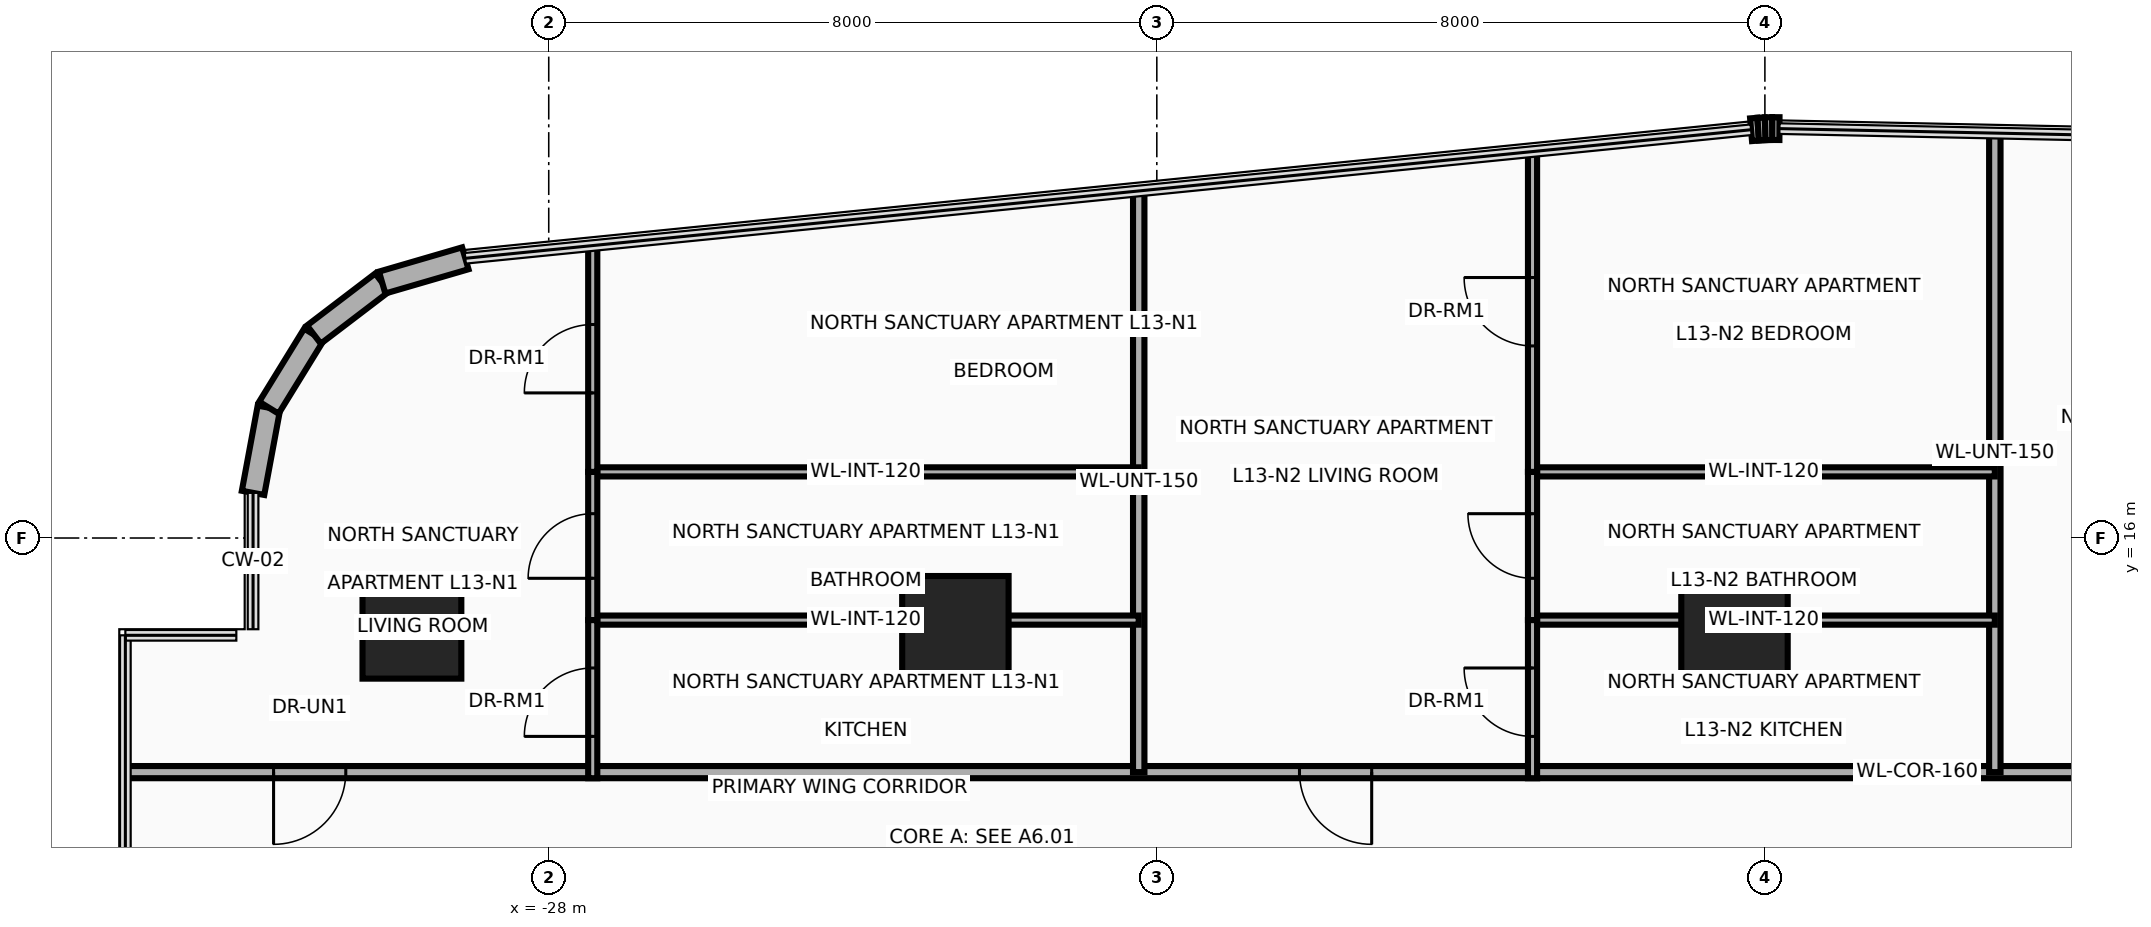
"""IFC4 building model, lengths in metres.
Left out: names, types, materials, properties, quantities, classifications, styles, units other than length and angle.
Written with IfcOpenShell. Run it as: python <this file> out.ifc"""

import sys

from ifc_helpers import new_model, si_unit, direction, frame, frame_2d, origin, origin_2d, place, context, subcontext, project, spatial, rectangle, circle, extrude, source, transform, mapped, element, fill, save


model = new_model("IFC4")
c1 = context("Model", 3, precision=1e-05, world=origin(), true_north=direction((0.0, 1.0)))
c2 = subcontext(c1, "Body", "Model", "MODEL_VIEW")
j1 = project(units=[si_unit("LENGTHUNIT", "METRE"), si_unit("PLANEANGLEUNIT", "RADIAN")], contexts=[c1])
p1 = place(None, origin())
s1 = spatial("IfcSite", under=j1, at=p1, CompositionType="ELEMENT")
p2 = place(p1, origin())
s2 = spatial("IfcBuilding", under=s1, at=p2, CompositionType="ELEMENT")
p3 = place(p2, frame((0.0, 0.0, 55.6)))
s3 = spatial("IfcBuildingStorey", under=s2, at=p3, CompositionType="ELEMENT", Elevation=55.6)
m1 = source(origin(), c2, "Body", "SweptSolid", [
    extrude(circle(Radius=0.65, at=origin_2d()), origin(), (0.0, 0.0, 1.0), 3.7),
])
p4 = place(p3, frame((-29.8, 14.8, 0.0), z_axis=(0.0, 0.0, 1.0), x_axis=(1.0, 0.0, 0.0)))
e1 = element("IfcColumn", 1, at=p4, inside=s3, PredefinedType="COLUMN", context=c2, shape_type="MappedRepresentation", body=[
    mapped(m1, transform((0.0, 0.0, 0.0), x_axis=(1.0, 0.0, 0.0), y_axis=(0.0, 1.0, 0.0), z_axis=(0.0, 0.0, 1.0), scale=1.0)),
])
m2 = source(origin(), c2, "Body", "SweptSolid", [
    extrude(rectangle(XDim=1.4, YDim=1.4, at=origin_2d()), origin(), (0.0, 0.0, 1.0), 3.7),
])
for number, where, z_axis, x_axis in (
    (2, (-22.65, 14.8, 0.0), (0.0, 0.0, 1.0), (1.0, 0.0, 0.0)),
    (3, (-12.4, 14.8, 0.0), (0.0, 0.0, 1.0), (1.0, 0.0, 0.0)),
):
    element("IfcColumn", number, at=place(p3, frame(where, z_axis=z_axis, x_axis=x_axis)), inside=s3, PredefinedType="COLUMN", context=c2, shape_type="MappedRepresentation", body=[
        mapped(m2, transform((0.0, 0.0, 0.0), x_axis=(1.0, 0.0, 0.0), y_axis=(0.0, 1.0, 0.0), z_axis=(0.0, 0.0, 1.0), scale=1.0)),
    ])
p5 = place(p3, frame((-31.89, 16.594, 0.0), z_axis=(0.0, 0.0, 1.0), x_axis=(0.182748995683, 0.9831596028, 0.0)))
e4 = element("IfcWall", 4, at=p5, inside=s3, PredefinedType="SOLIDWALL", context=c2, shape_type="SweptSolid", body=[
    extrude(rectangle(XDim=1.14, YDim=0.3, at=frame_2d((0.57, 0.0))), origin(), (0.0, 0.0, 1.0), 3.46),
])
p6 = place(p3, frame((-31.682, 17.714, 0.0), z_axis=(0.0, 0.0, 1.0), x_axis=(0.524157723014, 0.8516212077, 0.0)))
e5 = element("IfcWall", 5, at=p6, inside=s3, PredefinedType="SOLIDWALL", context=c2, shape_type="SweptSolid", body=[
    extrude(rectangle(XDim=1.129, YDim=0.3, at=frame_2d((0.565, 0.0))), origin(), (0.0, 0.0, 1.0), 3.46),
])
p7 = place(p3, frame((-31.09, 18.676, 0.0), z_axis=(0.0, 0.0, 1.0), x_axis=(0.795253002434, 0.606277710393, 0.0)))
e6 = element("IfcWall", 6, at=p7, inside=s3, PredefinedType="SOLIDWALL", context=c2, shape_type="SweptSolid", body=[
    extrude(rectangle(XDim=1.129, YDim=0.3, at=frame_2d((0.564, 0.0))), origin(), (0.0, 0.0, 1.0), 3.46),
])
p8 = place(p3, frame((-30.192, 19.361, 0.0), z_axis=(0.0, 0.0, 1.0), x_axis=(0.960071941549, 0.279753225271, 0.0)))
e7 = element("IfcWall", 7, at=p8, inside=s3, PredefinedType="SOLIDWALL", context=c2, shape_type="SweptSolid", body=[
    extrude(rectangle(XDim=1.14, YDim=0.3, at=frame_2d((0.57, 0.0))), origin(), (0.0, 0.0, 1.0), 3.46),
])
p9 = place(p3, frame((-12.182, 21.371, 0.0), z_axis=(0.0, 0.0, 1.0), x_axis=(0.996527790842, 0.08326080759, 0.0)))
e8 = element("IfcWall", 8, at=p9, inside=s3, PredefinedType="SOLIDWALL", context=c2, shape_type="SweptSolid", body=[
    extrude(rectangle(XDim=0.094, YDim=0.3, at=frame_2d((0.047, 0.0))), origin(), (0.0, 0.0, 1.0), 3.46),
])
p10 = place(p3, frame((-12.088, 21.379, 0.0), z_axis=(0.0, 0.0, 1.0), x_axis=(0.998476480444, 0.055178963393, 0.0)))
e9 = element("IfcWall", 9, at=p10, inside=s3, PredefinedType="SOLIDWALL", context=c2, shape_type="SweptSolid", body=[
    extrude(rectangle(XDim=0.093, YDim=0.3, at=frame_2d((0.046, 0.0))), origin(), (0.0, 0.0, 1.0), 3.46),
])
p11 = place(p3, frame((-11.996, 21.384, 0.0), z_axis=(0.0, 0.0, 1.0), x_axis=(0.999722573757, 0.023553673204, 0.0)))
e10 = element("IfcWall", 10, at=p11, inside=s3, PredefinedType="SOLIDWALL", context=c2, shape_type="SweptSolid", body=[
    extrude(rectangle(XDim=0.093, YDim=0.3, at=frame_2d((0.047, 0.0))), origin(), (0.0, 0.0, 1.0), 3.46),
])
p12 = place(p3, frame((-11.902, 21.386, 0.0), z_axis=(0.0, 0.0, 1.0), x_axis=(0.999986507273, -0.005194735103, 0.0)))
e11 = element("IfcWall", 11, at=p12, inside=s3, PredefinedType="SOLIDWALL", context=c2, shape_type="SweptSolid", body=[
    extrude(rectangle(XDim=0.094, YDim=0.3, at=frame_2d((0.047, 0.0))), origin(), (0.0, 0.0, 1.0), 3.46),
])
p13 = place(p3, frame((-33.54, 12.92, 0.0), z_axis=(0.0, 0.0, 1.0), x_axis=(1.0, 0.0, 0.0)))
e12 = element("IfcWall", 12, at=p13, inside=s3, PredefinedType="PARTITIONING", context=c2, shape_type="SweptSolid", body=[
    extrude(rectangle(XDim=47.09, YDim=0.16, at=frame_2d((23.545, 0.0))), origin(), (0.0, 0.0, 1.0), 2.583),
])
p14 = place(p13, frame((1.92, 0.0, 0.0)))
e13 = element("IfcOpeningElement", 13, at=p14, cuts=e12, PredefinedType="OPENING", context=c2, shape_type="SweptSolid", body=[
    extrude(rectangle(XDim=0.95, YDim=2.15, at=frame_2d((0.475, 1.075))), frame((0.0, 0.095, 0.0), z_axis=(0.0, -1.0, 0.0), x_axis=(1.0, 0.0, 0.0)), (0.0, 0.0, 1.0), 0.19),
])
p15 = place(p13, frame((15.417, 0.0, 0.0)))
e14 = element("IfcOpeningElement", 14, at=p15, cuts=e12, PredefinedType="OPENING", context=c2, shape_type="SweptSolid", body=[
    extrude(rectangle(XDim=0.95, YDim=2.15, at=frame_2d((0.475, 1.075))), frame((0.0, 0.095, 0.0), z_axis=(0.0, -1.0, 0.0), x_axis=(1.0, 0.0, 0.0)), (0.0, 0.0, 1.0), 0.19),
])
p16 = place(p13, frame((27.505, 0.0, 0.0)))
e15 = element("IfcOpeningElement", 15, at=p16, cuts=e12, PredefinedType="OPENING", context=c2, shape_type="SweptSolid", body=[
    extrude(rectangle(XDim=0.95, YDim=2.15, at=frame_2d((0.475, 1.075))), frame((0.0, 0.095, 0.0), z_axis=(0.0, -1.0, 0.0), x_axis=(1.0, 0.0, 0.0)), (0.0, 0.0, 1.0), 0.19),
])
p17 = place(p13, frame((37.943, 0.0, 0.0)))
e16 = element("IfcOpeningElement", 16, at=p17, cuts=e12, PredefinedType="OPENING", context=c2, shape_type="SweptSolid", body=[
    extrude(rectangle(XDim=0.95, YDim=2.15, at=frame_2d((0.475, 1.075))), frame((0.0, 0.095, 0.0), z_axis=(0.0, -1.0, 0.0), x_axis=(1.0, 0.0, 0.0)), (0.0, 0.0, 1.0), 0.19),
])
p18 = place(p3, frame((-20.238, 12.92, 0.0), z_axis=(0.0, 0.0, 1.0), x_axis=(0.0, 1.0, 0.0)))
e17 = element("IfcWall", 17, at=p18, inside=s3, PredefinedType="PARTITIONING", context=c2, shape_type="SweptSolid", body=[
    extrude(rectangle(XDim=7.646, YDim=0.15, at=frame_2d((3.823, 0.0))), origin(), (0.0, 0.0, 1.0), 2.583),
])
p19 = place(p3, frame((-8.975, 12.92, 0.0), z_axis=(0.0, 0.0, 1.0), x_axis=(0.0, 1.0, 0.0)))
e18 = element("IfcWall", 18, at=p19, inside=s3, PredefinedType="PARTITIONING", context=c2, shape_type="SweptSolid", body=[
    extrude(rectangle(XDim=8.407, YDim=0.15, at=frame_2d((4.204, 0.0))), origin(), (0.0, 0.0, 1.0), 2.583),
])
p20 = place(p3, frame((-27.421, 14.92, 0.0), z_axis=(0.0, 0.0, 1.0), x_axis=(1.0, 0.0, 0.0)))
e19 = element("IfcWall", 19, at=p20, inside=s3, PredefinedType="PARTITIONING", context=c2, shape_type="SweptSolid", body=[
    extrude(rectangle(XDim=7.183, YDim=0.12, at=frame_2d((3.592, 0.0))), origin(), (0.0, 0.0, 1.0), 2.583),
])
p21 = place(p3, frame((-27.421, 16.87, 0.0), z_axis=(0.0, 0.0, 1.0), x_axis=(1.0, 0.0, 0.0)))
e20 = element("IfcWall", 20, at=p21, inside=s3, PredefinedType="PARTITIONING", context=c2, shape_type="SweptSolid", body=[
    extrude(rectangle(XDim=7.183, YDim=0.12, at=frame_2d((3.592, 0.0))), origin(), (0.0, 0.0, 1.0), 3.46),
])
p22 = place(p3, frame((-27.421, 14.92, 0.0), z_axis=(0.0, 0.0, 1.0), x_axis=(0.0, 1.0, 0.0)))
e21 = element("IfcWall", 21, at=p22, inside=s3, PredefinedType="PARTITIONING", context=c2, shape_type="SweptSolid", body=[
    extrude(rectangle(XDim=1.95, YDim=0.12, at=frame_2d((0.975, 0.0))), origin(), (0.0, 0.0, 1.0), 2.583),
])
p23 = place(p22, frame((0.55, 0.0, 0.0)))
e22 = element("IfcOpeningElement", 22, at=p23, cuts=e21, PredefinedType="OPENING", context=c2, shape_type="SweptSolid", body=[
    extrude(rectangle(XDim=0.85, YDim=2.1, at=frame_2d((0.425, 1.05))), frame((0.0, 0.075, 0.0), z_axis=(0.0, -1.0, 0.0), x_axis=(1.0, 0.0, 0.0)), (0.0, 0.0, 1.0), 0.15),
])
p24 = place(p3, frame((-27.421, 12.84, 0.0), z_axis=(0.0, 0.0, 1.0), x_axis=(0.0, 1.0, 0.0)))
e23 = element("IfcWall", 23, at=p24, inside=s3, PredefinedType="PARTITIONING", context=c2, shape_type="SweptSolid", body=[
    extrude(rectangle(XDim=2.08, YDim=0.12, at=frame_2d((1.04, 0.0))), origin(), (0.0, 0.0, 1.0), 2.583),
])
p25 = place(p24, frame((0.55, 0.0, 0.0)))
e24 = element("IfcOpeningElement", 24, at=p25, cuts=e23, PredefinedType="OPENING", context=c2, shape_type="SweptSolid", body=[
    extrude(rectangle(XDim=0.9, YDim=2.1, at=frame_2d((0.45, 1.05))), frame((0.0, 0.075, 0.0), z_axis=(0.0, -1.0, 0.0), x_axis=(1.0, 0.0, 0.0)), (0.0, 0.0, 1.0), 0.15),
])
p26 = place(p3, frame((-27.421, 16.87, 0.0), z_axis=(0.0, 0.0, 1.0), x_axis=(0.0, 1.0, 0.0)))
e25 = element("IfcWall", 25, at=p26, inside=s3, PredefinedType="PARTITIONING", context=c2, shape_type="SweptSolid", body=[
    extrude(rectangle(XDim=2.977, YDim=0.12, at=frame_2d((1.489, 0.0))), origin(), (0.0, 0.0, 1.0), 3.46),
])
p27 = place(p26, frame((1.039, 0.0, 0.0)))
e26 = element("IfcOpeningElement", 26, at=p27, cuts=e25, PredefinedType="OPENING", context=c2, shape_type="SweptSolid", body=[
    extrude(rectangle(XDim=0.9, YDim=2.1, at=frame_2d((0.45, 1.05))), frame((0.0, 0.075, 0.0), z_axis=(0.0, -1.0, 0.0), x_axis=(1.0, 0.0, 0.0)), (0.0, 0.0, 1.0), 0.15),
])
p28 = place(p3, frame((-15.057, 14.92, 0.0), z_axis=(0.0, 0.0, 1.0), x_axis=(1.0, 0.0, 0.0)))
e27 = element("IfcWall", 27, at=p28, inside=s3, PredefinedType="PARTITIONING", context=c2, shape_type="SweptSolid", body=[
    extrude(rectangle(XDim=6.082, YDim=0.12, at=frame_2d((3.041, 0.0))), origin(), (0.0, 0.0, 1.0), 2.583),
])
p29 = place(p3, frame((-15.057, 16.87, 0.0), z_axis=(0.0, 0.0, 1.0), x_axis=(1.0, 0.0, 0.0)))
e28 = element("IfcWall", 28, at=p29, inside=s3, PredefinedType="PARTITIONING", context=c2, shape_type="SweptSolid", body=[
    extrude(rectangle(XDim=6.082, YDim=0.12, at=frame_2d((3.041, 0.0))), origin(), (0.0, 0.0, 1.0), 3.46),
])
p30 = place(p3, frame((-15.057, 14.92, 0.0), z_axis=(0.0, 0.0, 1.0), x_axis=(0.0, 1.0, 0.0)))
e29 = element("IfcWall", 29, at=p30, inside=s3, PredefinedType="PARTITIONING", context=c2, shape_type="SweptSolid", body=[
    extrude(rectangle(XDim=1.95, YDim=0.12, at=frame_2d((0.975, 0.0))), origin(), (0.0, 0.0, 1.0), 2.583),
])
p31 = place(p30, frame((0.55, 0.0, 0.0)))
e30 = element("IfcOpeningElement", 30, at=p31, cuts=e29, PredefinedType="OPENING", context=c2, shape_type="SweptSolid", body=[
    extrude(rectangle(XDim=0.85, YDim=2.1, at=frame_2d((0.425, 1.05))), frame((0.0, 0.075, 0.0), z_axis=(0.0, -1.0, 0.0), x_axis=(1.0, 0.0, 0.0)), (0.0, 0.0, 1.0), 0.15),
])
p32 = place(p3, frame((-15.057, 12.84, 0.0), z_axis=(0.0, 0.0, 1.0), x_axis=(0.0, 1.0, 0.0)))
e31 = element("IfcWall", 31, at=p32, inside=s3, PredefinedType="PARTITIONING", context=c2, shape_type="SweptSolid", body=[
    extrude(rectangle(XDim=2.08, YDim=0.12, at=frame_2d((1.04, 0.0))), origin(), (0.0, 0.0, 1.0), 2.583),
])
p33 = place(p32, frame((0.55, 0.0, 0.0)))
e32 = element("IfcOpeningElement", 32, at=p33, cuts=e31, PredefinedType="OPENING", context=c2, shape_type="SweptSolid", body=[
    extrude(rectangle(XDim=0.9, YDim=2.1, at=frame_2d((0.45, 1.05))), frame((0.0, 0.075, 0.0), z_axis=(0.0, -1.0, 0.0), x_axis=(1.0, 0.0, 0.0)), (0.0, 0.0, 1.0), 0.15),
])
p34 = place(p3, frame((-15.057, 16.87, 0.0), z_axis=(0.0, 0.0, 1.0), x_axis=(0.0, 1.0, 0.0)))
e33 = element("IfcWall", 33, at=p34, inside=s3, PredefinedType="PARTITIONING", context=c2, shape_type="SweptSolid", body=[
    extrude(rectangle(XDim=4.214, YDim=0.12, at=frame_2d((2.107, 0.0))), origin(), (0.0, 0.0, 1.0), 3.46),
])
p35 = place(p34, frame((1.657, 0.0, 0.0)))
e34 = element("IfcOpeningElement", 34, at=p35, cuts=e33, PredefinedType="OPENING", context=c2, shape_type="SweptSolid", body=[
    extrude(rectangle(XDim=0.9, YDim=2.1, at=frame_2d((0.45, 1.05))), frame((0.0, 0.075, 0.0), z_axis=(0.0, -1.0, 0.0), x_axis=(1.0, 0.0, 0.0)), (0.0, 0.0, 1.0), 0.15),
])
p36 = place(p14, frame((0.95, 0.0, 0.0), z_axis=(0.0, 0.0, 1.0), x_axis=(-1.0, 0.0, 0.0)))
e35 = element("IfcDoor", 35, at=p36, inside=s3, OperationType="SINGLE_SWING_LEFT", PredefinedType="DOOR", context=c2, shape_type="SweptSolid", body=[
    extrude(rectangle(XDim=0.95, YDim=2.15, at=frame_2d((0.475, 1.075))), frame((0.0, 0.025, 0.0), z_axis=(0.0, -1.0, 0.0), x_axis=(1.0, 0.0, 0.0)), (0.0, 0.0, 1.0), 0.05),
])
fill(e13, e35)
p37 = place(p23, origin())
e36 = element("IfcDoor", 36, at=p37, inside=s3, OperationType="SINGLE_SWING_RIGHT", PredefinedType="DOOR", context=c2, shape_type="SweptSolid", body=[
    extrude(rectangle(XDim=0.85, YDim=2.1, at=frame_2d((0.425, 1.05))), frame((0.0, 0.025, 0.0), z_axis=(0.0, -1.0, 0.0), x_axis=(1.0, 0.0, 0.0)), (0.0, 0.0, 1.0), 0.05),
])
fill(e22, e36)
p38 = place(p25, origin())
e37 = element("IfcDoor", 37, at=p38, inside=s3, OperationType="SINGLE_SWING_LEFT", PredefinedType="DOOR", context=c2, shape_type="SweptSolid", body=[
    extrude(rectangle(XDim=0.9, YDim=2.1, at=frame_2d((0.45, 1.05))), frame((0.0, 0.025, 0.0), z_axis=(0.0, -1.0, 0.0), x_axis=(1.0, 0.0, 0.0)), (0.0, 0.0, 1.0), 0.05),
])
fill(e24, e37)
p39 = place(p27, origin())
e38 = element("IfcDoor", 38, at=p39, inside=s3, OperationType="SINGLE_SWING_RIGHT", PredefinedType="DOOR", context=c2, shape_type="SweptSolid", body=[
    extrude(rectangle(XDim=0.9, YDim=2.1, at=frame_2d((0.45, 1.05))), frame((0.0, 0.025, 0.0), z_axis=(0.0, -1.0, 0.0), x_axis=(1.0, 0.0, 0.0)), (0.0, 0.0, 1.0), 0.05),
])
fill(e26, e38)
p40 = place(p15, frame((0.95, 0.0, 0.0), z_axis=(0.0, 0.0, 1.0), x_axis=(-1.0, 0.0, 0.0)))
e39 = element("IfcDoor", 39, at=p40, inside=s3, OperationType="SINGLE_SWING_LEFT", PredefinedType="DOOR", context=c2, shape_type="SweptSolid", body=[
    extrude(rectangle(XDim=0.95, YDim=2.15, at=frame_2d((0.475, 1.075))), frame((0.0, 0.025, 0.0), z_axis=(0.0, -1.0, 0.0), x_axis=(1.0, 0.0, 0.0)), (0.0, 0.0, 1.0), 0.05),
])
fill(e14, e39)
p41 = place(p31, origin())
e40 = element("IfcDoor", 40, at=p41, inside=s3, OperationType="SINGLE_SWING_RIGHT", PredefinedType="DOOR", context=c2, shape_type="SweptSolid", body=[
    extrude(rectangle(XDim=0.85, YDim=2.1, at=frame_2d((0.425, 1.05))), frame((0.0, 0.025, 0.0), z_axis=(0.0, -1.0, 0.0), x_axis=(1.0, 0.0, 0.0)), (0.0, 0.0, 1.0), 0.05),
])
fill(e30, e40)
p42 = place(p33, origin())
e41 = element("IfcDoor", 41, at=p42, inside=s3, OperationType="SINGLE_SWING_LEFT", PredefinedType="DOOR", context=c2, shape_type="SweptSolid", body=[
    extrude(rectangle(XDim=0.9, YDim=2.1, at=frame_2d((0.45, 1.05))), frame((0.0, 0.025, 0.0), z_axis=(0.0, -1.0, 0.0), x_axis=(1.0, 0.0, 0.0)), (0.0, 0.0, 1.0), 0.05),
])
fill(e32, e41)
p43 = place(p35, origin())
e42 = element("IfcDoor", 42, at=p43, inside=s3, OperationType="SINGLE_SWING_RIGHT", PredefinedType="DOOR", context=c2, shape_type="SweptSolid", body=[
    extrude(rectangle(XDim=0.9, YDim=2.1, at=frame_2d((0.45, 1.05))), frame((0.0, 0.025, 0.0), z_axis=(0.0, -1.0, 0.0), x_axis=(1.0, 0.0, 0.0)), (0.0, 0.0, 1.0), 0.05),
])
fill(e34, e42)
save(model, sys.argv[1])
